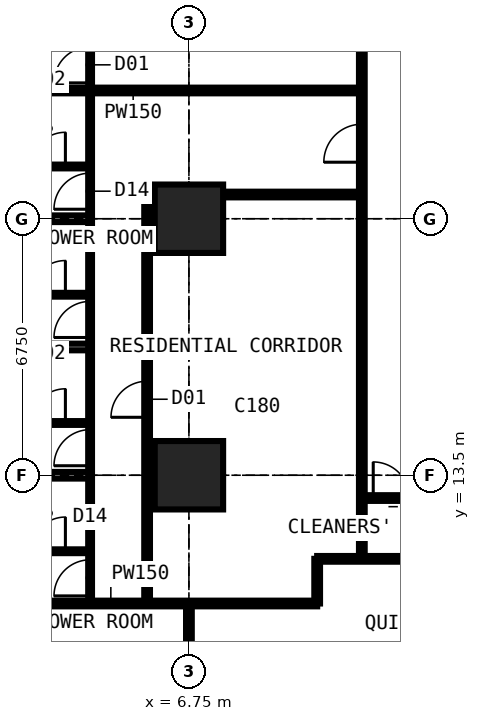
"""IFC4 building model, lengths in metres.
Left out: names, types, materials, properties, quantities, classifications, styles, units other than length and angle.
Written with IfcOpenShell. Run it as: python <this file> out.ifc"""

import sys

from ifc_helpers import new_model, si_unit, direction, frame, frame_2d, origin, origin_2d, place, context, subcontext, project, spatial, rectangle, extrude, element, fill, save


model = new_model("IFC4")
c1 = context("Model", 3, precision=1e-05, world=origin(), true_north=direction((0.0, 1.0)))
c2 = subcontext(c1, "Body", "Model", "MODEL_VIEW")
j1 = project(units=[si_unit("LENGTHUNIT", "METRE"), si_unit("PLANEANGLEUNIT", "RADIAN")], contexts=[c1])
p1 = place(None, origin())
s1 = spatial("IfcSite", under=j1, at=p1, CompositionType="ELEMENT")
p2 = place(p1, origin())
s2 = spatial("IfcBuilding", under=s1, at=p2, CompositionType="ELEMENT")
p3 = place(p2, frame((0.0, 0.0, 94.5)))
s3 = spatial("IfcBuildingStorey", under=s2, at=p3, CompositionType="ELEMENT", Elevation=94.5)
for number, where, z_axis, x_axis in (
    (1, (6.75, 13.5, 0.0), (0.0, 0.0, 1.0), (1.0, 0.0, 0.0)),
    (2, (6.75, 20.25, 0.0), (0.0, 0.0, 1.0), (1.0, 0.0, 0.0)),
):
    element("IfcColumn", number, at=place(p3, frame(where, z_axis=z_axis, x_axis=x_axis)), inside=s3, PredefinedType="COLUMN", context=c2, shape_type="SweptSolid", body=[
        extrude(rectangle(XDim=1.8, YDim=1.8, at=origin_2d()), origin(), (0.0, 0.0, 1.0), 3.6),
    ])
p4 = place(p3, frame((-0.734, 10.125, 0.0), z_axis=(0.0, 0.0, 1.0), x_axis=(1.0, 0.0, 0.0)))
e3 = element("IfcWall", 3, at=p4, inside=s3, PredefinedType="PARTITIONING", context=c2, shape_type="SweptSolid", body=[
    extrude(rectangle(XDim=10.859, YDim=0.15, at=frame_2d((5.429, 0.0))), origin(), (0.0, 0.0, 1.0), 3.375),
])
p5 = place(p3, frame((-0.734, 13.5, 0.0), z_axis=(0.0, 0.0, 1.0), x_axis=(1.0, 0.0, 0.0)))
e4 = element("IfcWall", 4, at=p5, inside=s3, PredefinedType="PARTITIONING", context=c2, shape_type="SweptSolid", body=[
    extrude(rectangle(XDim=4.884, YDim=0.175, at=frame_2d((2.442, 0.0))), origin(), (0.0, 0.0, 1.0), 2.877),
])
p6 = place(p3, frame((-0.734, 16.875, 0.0), z_axis=(0.0, 0.0, 1.0), x_axis=(1.0, 0.0, 0.0)))
e5 = element("IfcWall", 5, at=p6, inside=s3, PredefinedType="PARTITIONING", context=c2, shape_type="SweptSolid", body=[
    extrude(rectangle(XDim=4.884, YDim=0.175, at=frame_2d((2.442, 0.0))), origin(), (0.0, 0.0, 1.0), 3.375),
])
p7 = place(p3, frame((-0.734, 20.25, 0.0), z_axis=(0.0, 0.0, 1.0), x_axis=(1.0, 0.0, 0.0)))
e6 = element("IfcWall", 6, at=p7, inside=s3, PredefinedType="PARTITIONING", context=c2, shape_type="SweptSolid", body=[
    extrude(rectangle(XDim=4.884, YDim=0.175, at=frame_2d((2.442, 0.0))), origin(), (0.0, 0.0, 1.0), 2.877),
])
p8 = place(p3, frame((-0.734, 23.625, 0.0), z_axis=(0.0, 0.0, 1.0), x_axis=(1.0, 0.0, 0.0)))
e7 = element("IfcWall", 7, at=p8, inside=s3, PredefinedType="PARTITIONING", context=c2, shape_type="SweptSolid", body=[
    extrude(rectangle(XDim=12.034, YDim=0.15, at=frame_2d((6.017, 0.0))), origin(), (0.0, 0.0, 1.0), 3.375),
])
p9 = place(p3, frame((1.95, 11.5, 0.0), z_axis=(0.0, 0.0, 1.0), x_axis=(1.0, 0.0, 0.0)))
e8 = element("IfcWall", 8, at=p9, inside=s3, PredefinedType="PARTITIONING", context=c2, shape_type="SweptSolid", body=[
    extrude(rectangle(XDim=2.2, YDim=0.1, at=frame_2d((1.1, 0.0))), origin(), (0.0, 0.0, 1.0), 3.375),
])
p10 = place(p9, frame((0.65, 0.0, 0.0)))
e9 = element("IfcOpeningElement", 9, at=p10, cuts=e8, PredefinedType="OPENING", context=c2, shape_type="SweptSolid", body=[
    extrude(rectangle(XDim=0.9, YDim=2.2, at=frame_2d((0.45, 1.1))), frame((0.0, 0.06, 0.0), z_axis=(0.0, -1.0, 0.0), x_axis=(1.0, 0.0, 0.0)), (0.0, 0.0, 1.0), 0.12),
])
p11 = place(p3, frame((1.95, 14.875, 0.0), z_axis=(0.0, 0.0, 1.0), x_axis=(1.0, 0.0, 0.0)))
e10 = element("IfcWall", 10, at=p11, inside=s3, PredefinedType="PARTITIONING", context=c2, shape_type="SweptSolid", body=[
    extrude(rectangle(XDim=2.2, YDim=0.1, at=frame_2d((1.1, 0.0))), origin(), (0.0, 0.0, 1.0), 3.375),
])
p12 = place(p11, frame((0.65, 0.0, 0.0)))
e11 = element("IfcOpeningElement", 11, at=p12, cuts=e10, PredefinedType="OPENING", context=c2, shape_type="SweptSolid", body=[
    extrude(rectangle(XDim=0.9, YDim=2.2, at=frame_2d((0.45, 1.1))), frame((0.0, 0.06, 0.0), z_axis=(0.0, -1.0, 0.0), x_axis=(1.0, 0.0, 0.0)), (0.0, 0.0, 1.0), 0.12),
])
p13 = place(p3, frame((1.95, 18.25, 0.0), z_axis=(0.0, 0.0, 1.0), x_axis=(1.0, 0.0, 0.0)))
e12 = element("IfcWall", 12, at=p13, inside=s3, PredefinedType="PARTITIONING", context=c2, shape_type="SweptSolid", body=[
    extrude(rectangle(XDim=2.2, YDim=0.1, at=frame_2d((1.1, 0.0))), origin(), (0.0, 0.0, 1.0), 3.375),
])
p14 = place(p13, frame((0.65, 0.0, 0.0)))
e13 = element("IfcOpeningElement", 13, at=p14, cuts=e12, PredefinedType="OPENING", context=c2, shape_type="SweptSolid", body=[
    extrude(rectangle(XDim=0.9, YDim=2.2, at=frame_2d((0.45, 1.1))), frame((0.0, 0.06, 0.0), z_axis=(0.0, -1.0, 0.0), x_axis=(1.0, 0.0, 0.0)), (0.0, 0.0, 1.0), 0.12),
])
p15 = place(p3, frame((1.95, 21.625, 0.0), z_axis=(0.0, 0.0, 1.0), x_axis=(1.0, 0.0, 0.0)))
e14 = element("IfcWall", 14, at=p15, inside=s3, PredefinedType="PARTITIONING", context=c2, shape_type="SweptSolid", body=[
    extrude(rectangle(XDim=2.2, YDim=0.1, at=frame_2d((1.1, 0.0))), origin(), (0.0, 0.0, 1.0), 3.375),
])
p16 = place(p15, frame((0.65, 0.0, 0.0)))
e15 = element("IfcOpeningElement", 15, at=p16, cuts=e14, PredefinedType="OPENING", context=c2, shape_type="SweptSolid", body=[
    extrude(rectangle(XDim=0.9, YDim=2.2, at=frame_2d((0.45, 1.1))), frame((0.0, 0.06, 0.0), z_axis=(0.0, -1.0, 0.0), x_axis=(1.0, 0.0, 0.0)), (0.0, 0.0, 1.0), 0.12),
])
p17 = place(p3, frame((4.15, 10.125, 0.0), z_axis=(0.0, 0.0, 1.0), x_axis=(0.0, 1.0, 0.0)))
e16 = element("IfcWall", 16, at=p17, inside=s3, PredefinedType="PARTITIONING", context=c2, shape_type="SweptSolid", body=[
    extrude(rectangle(XDim=16.875, YDim=0.1, at=frame_2d((8.438, 0.0))), origin(), (0.0, 0.0, 1.0), 3.375),
])
p18 = place(p17, frame((13.7, 0.0, 0.0)))
e17 = element("IfcOpeningElement", 17, at=p18, cuts=e16, PredefinedType="OPENING", context=c2, shape_type="SweptSolid", body=[
    extrude(rectangle(XDim=0.95, YDim=2.2, at=frame_2d((0.475, 1.1))), frame((0.0, 0.06, 0.0), z_axis=(0.0, -1.0, 0.0), x_axis=(1.0, 0.0, 0.0)), (0.0, 0.0, 1.0), 0.12),
])
p19 = place(p17, frame((0.2, 0.0, 0.0)))
e18 = element("IfcOpeningElement", 18, at=p19, cuts=e16, PredefinedType="OPENING", context=c2, shape_type="SweptSolid", body=[
    extrude(rectangle(XDim=0.95, YDim=2.2, at=frame_2d((0.475, 1.1))), frame((0.0, 0.06, 0.0), z_axis=(0.0, -1.0, 0.0), x_axis=(1.0, 0.0, 0.0)), (0.0, 0.0, 1.0), 0.12),
])
p20 = place(p17, frame((3.625, 0.0, 0.0)))
e19 = element("IfcOpeningElement", 19, at=p20, cuts=e16, PredefinedType="OPENING", context=c2, shape_type="SweptSolid", body=[
    extrude(rectangle(XDim=0.95, YDim=2.2, at=frame_2d((0.475, 1.1))), frame((0.0, 0.06, 0.0), z_axis=(0.0, -1.0, 0.0), x_axis=(1.0, 0.0, 0.0)), (0.0, 0.0, 1.0), 0.12),
])
p21 = place(p17, frame((7.0, 0.0, 0.0)))
e20 = element("IfcOpeningElement", 20, at=p21, cuts=e16, PredefinedType="OPENING", context=c2, shape_type="SweptSolid", body=[
    extrude(rectangle(XDim=0.95, YDim=2.2, at=frame_2d((0.475, 1.1))), frame((0.0, 0.06, 0.0), z_axis=(0.0, -1.0, 0.0), x_axis=(1.0, 0.0, 0.0)), (0.0, 0.0, 1.0), 0.12),
])
p22 = place(p17, frame((10.375, 0.0, 0.0)))
e21 = element("IfcOpeningElement", 21, at=p22, cuts=e16, PredefinedType="OPENING", context=c2, shape_type="SweptSolid", body=[
    extrude(rectangle(XDim=0.95, YDim=2.2, at=frame_2d((0.475, 1.1))), frame((0.0, 0.06, 0.0), z_axis=(0.0, -1.0, 0.0), x_axis=(1.0, 0.0, 0.0)), (0.0, 0.0, 1.0), 0.12),
])
p23 = place(p3, frame((5.65, 10.125, 0.0), z_axis=(0.0, 0.0, 1.0), x_axis=(0.0, 1.0, 0.0)))
e22 = element("IfcWall", 22, at=p23, inside=s3, PredefinedType="PARTITIONING", context=c2, shape_type="SweptSolid", body=[
    extrude(rectangle(XDim=10.762, YDim=0.15, at=frame_2d((5.381, 0.0))), origin(), (0.0, 0.0, 1.0), 3.375),
])
p24 = place(p23, frame((4.9, 0.0, 0.0)))
e23 = element("IfcOpeningElement", 23, at=p24, cuts=e22, PredefinedType="OPENING", context=c2, shape_type="SweptSolid", body=[
    extrude(rectangle(XDim=0.95, YDim=2.2, at=frame_2d((0.475, 1.1))), frame((0.0, 0.085, 0.0), z_axis=(0.0, -1.0, 0.0), x_axis=(1.0, 0.0, 0.0)), (0.0, 0.0, 1.0), 0.17),
])
p25 = place(p3, frame((5.65, 20.887, 0.0), z_axis=(0.0, 0.0, 1.0), x_axis=(1.0, 0.0, 0.0)))
e24 = element("IfcWall", 24, at=p25, inside=s3, PredefinedType="PARTITIONING", context=c2, shape_type="SweptSolid", body=[
    extrude(rectangle(XDim=5.65, YDim=0.15, at=frame_2d((2.825, 0.0))), origin(), (0.0, 0.0, 1.0), 3.375),
])
p26 = place(p3, frame((6.75, 4.15, 0.0), z_axis=(0.0, 0.0, 1.0), x_axis=(0.0, 1.0, 0.0)))
e25 = element("IfcWall", 25, at=p26, inside=s3, PredefinedType="PARTITIONING", context=c2, shape_type="SweptSolid", body=[
    extrude(rectangle(XDim=5.975, YDim=0.15, at=frame_2d((2.988, 0.0))), origin(), (0.0, 0.0, 1.0), 2.877),
])
p27 = place(p3, frame((10.125, 10.125, 0.0), z_axis=(0.0, 0.0, 1.0), x_axis=(0.0, 1.0, 0.0)))
e26 = element("IfcWall", 26, at=p27, inside=s3, PredefinedType="PARTITIONING", context=c2, shape_type="SweptSolid", body=[
    extrude(rectangle(XDim=1.175, YDim=0.15, at=frame_2d((0.587, 0.0))), origin(), (0.0, 0.0, 1.0), 3.375),
])
p28 = place(p3, frame((10.125, 11.3, 0.0), z_axis=(0.0, 0.0, 1.0), x_axis=(1.0, 0.0, 0.0)))
e27 = element("IfcWall", 27, at=p28, inside=s3, PredefinedType="PARTITIONING", context=c2, shape_type="SweptSolid", body=[
    extrude(rectangle(XDim=20.675, YDim=0.15, at=frame_2d((10.337, 0.0))), origin(), (0.0, 0.0, 1.0), 3.375),
])
p29 = place(p28, frame((11.312, 0.0, 0.0)))
e28 = element("IfcOpeningElement", 28, at=p29, cuts=e27, PredefinedType="OPENING", context=c2, shape_type="SweptSolid", body=[
    extrude(rectangle(XDim=1.0, YDim=2.2, at=frame_2d((0.5, 1.1))), frame((0.0, 0.085, 0.0), z_axis=(0.0, -1.0, 0.0), x_axis=(1.0, 0.0, 0.0)), (0.0, 0.0, 1.0), 0.17),
])
p30 = place(p3, frame((11.3, 11.3, 0.0), z_axis=(0.0, 0.0, 1.0), x_axis=(0.0, 1.0, 0.0)))
e29 = element("IfcWall", 29, at=p30, inside=s3, PredefinedType="PARTITIONING", context=c2, shape_type="SweptSolid", body=[
    extrude(rectangle(XDim=19.3, YDim=0.15, at=frame_2d((9.65, 0.0))), origin(), (0.0, 0.0, 1.0), 3.375),
])
p31 = place(p30, frame((13.525, 0.0, 0.0)))
e30 = element("IfcOpeningElement", 30, at=p31, cuts=e29, PredefinedType="OPENING", context=c2, shape_type="SweptSolid", body=[
    extrude(rectangle(XDim=1.0, YDim=2.2, at=frame_2d((0.5, 1.1))), frame((0.0, 0.085, 0.0), z_axis=(0.0, -1.0, 0.0), x_axis=(1.0, 0.0, 0.0)), (0.0, 0.0, 1.0), 0.17),
])
p32 = place(p30, frame((10.438, 0.0, 0.0)))
e31 = element("IfcOpeningElement", 31, at=p32, cuts=e29, PredefinedType="OPENING", context=c2, shape_type="SweptSolid", body=[
    extrude(rectangle(XDim=1.0, YDim=2.2, at=frame_2d((0.5, 1.1))), frame((0.0, 0.085, 0.0), z_axis=(0.0, -1.0, 0.0), x_axis=(1.0, 0.0, 0.0)), (0.0, 0.0, 1.0), 0.17),
])
p33 = place(p3, frame((11.3, 12.9, 0.0), z_axis=(0.0, 0.0, 1.0), x_axis=(1.0, 0.0, 0.0)))
e32 = element("IfcWall", 32, at=p33, inside=s3, PredefinedType="PARTITIONING", context=c2, shape_type="SweptSolid", body=[
    extrude(rectangle(XDim=1.6, YDim=0.15, at=frame_2d((0.8, 0.0))), origin(), (0.0, 0.0, 1.0), 2.806),
])
p34 = place(p33, frame((0.3, 0.0, 0.0)))
e33 = element("IfcOpeningElement", 33, at=p34, cuts=e32, PredefinedType="OPENING", context=c2, shape_type="SweptSolid", body=[
    extrude(rectangle(XDim=0.95, YDim=2.2, at=frame_2d((0.475, 1.1))), frame((0.0, 0.085, 0.0), z_axis=(0.0, -1.0, 0.0), x_axis=(1.0, 0.0, 0.0)), (0.0, 0.0, 1.0), 0.17),
])
p35 = place(p34, origin())
e34 = element("IfcDoor", 34, at=p35, inside=s3, OperationType="SINGLE_SWING_LEFT", PredefinedType="DOOR", context=c2, shape_type="SweptSolid", body=[
    extrude(rectangle(XDim=0.95, YDim=2.2, at=frame_2d((0.475, 1.1))), frame((0.0, 0.025, 0.0), z_axis=(0.0, -1.0, 0.0), x_axis=(1.0, 0.0, 0.0)), (0.0, 0.0, 1.0), 0.05),
])
fill(e33, e34)
p36 = place(p18, origin())
e35 = element("IfcDoor", 35, at=p36, inside=s3, OperationType="SINGLE_SWING_LEFT", PredefinedType="DOOR", context=c2, shape_type="SweptSolid", body=[
    extrude(rectangle(XDim=0.95, YDim=2.2, at=frame_2d((0.475, 1.1))), frame((0.0, 0.025, 0.0), z_axis=(0.0, -1.0, 0.0), x_axis=(1.0, 0.0, 0.0)), (0.0, 0.0, 1.0), 0.05),
])
fill(e17, e35)
p37 = place(p19, origin())
e36 = element("IfcDoor", 36, at=p37, inside=s3, OperationType="SINGLE_SWING_LEFT", PredefinedType="DOOR", context=c2, shape_type="SweptSolid", body=[
    extrude(rectangle(XDim=0.95, YDim=2.2, at=frame_2d((0.475, 1.1))), frame((0.0, 0.025, 0.0), z_axis=(0.0, -1.0, 0.0), x_axis=(1.0, 0.0, 0.0)), (0.0, 0.0, 1.0), 0.05),
])
fill(e18, e36)
p38 = place(p10, origin())
e37 = element("IfcDoor", 37, at=p38, inside=s3, OperationType="SINGLE_SWING_RIGHT", PredefinedType="DOOR", context=c2, shape_type="SweptSolid", body=[
    extrude(rectangle(XDim=0.9, YDim=2.2, at=frame_2d((0.45, 1.1))), frame((0.0, 0.025, 0.0), z_axis=(0.0, -1.0, 0.0), x_axis=(1.0, 0.0, 0.0)), (0.0, 0.0, 1.0), 0.05),
])
fill(e9, e37)
p39 = place(p20, origin())
e38 = element("IfcDoor", 38, at=p39, inside=s3, OperationType="SINGLE_SWING_LEFT", PredefinedType="DOOR", context=c2, shape_type="SweptSolid", body=[
    extrude(rectangle(XDim=0.95, YDim=2.2, at=frame_2d((0.475, 1.1))), frame((0.0, 0.025, 0.0), z_axis=(0.0, -1.0, 0.0), x_axis=(1.0, 0.0, 0.0)), (0.0, 0.0, 1.0), 0.05),
])
fill(e19, e38)
p40 = place(p12, origin())
e39 = element("IfcDoor", 39, at=p40, inside=s3, OperationType="SINGLE_SWING_RIGHT", PredefinedType="DOOR", context=c2, shape_type="SweptSolid", body=[
    extrude(rectangle(XDim=0.9, YDim=2.2, at=frame_2d((0.45, 1.1))), frame((0.0, 0.025, 0.0), z_axis=(0.0, -1.0, 0.0), x_axis=(1.0, 0.0, 0.0)), (0.0, 0.0, 1.0), 0.05),
])
fill(e11, e39)
p41 = place(p21, origin())
e40 = element("IfcDoor", 40, at=p41, inside=s3, OperationType="SINGLE_SWING_LEFT", PredefinedType="DOOR", context=c2, shape_type="SweptSolid", body=[
    extrude(rectangle(XDim=0.95, YDim=2.2, at=frame_2d((0.475, 1.1))), frame((0.0, 0.025, 0.0), z_axis=(0.0, -1.0, 0.0), x_axis=(1.0, 0.0, 0.0)), (0.0, 0.0, 1.0), 0.05),
])
fill(e20, e40)
p42 = place(p14, origin())
e41 = element("IfcDoor", 41, at=p42, inside=s3, OperationType="SINGLE_SWING_RIGHT", PredefinedType="DOOR", context=c2, shape_type="SweptSolid", body=[
    extrude(rectangle(XDim=0.9, YDim=2.2, at=frame_2d((0.45, 1.1))), frame((0.0, 0.025, 0.0), z_axis=(0.0, -1.0, 0.0), x_axis=(1.0, 0.0, 0.0)), (0.0, 0.0, 1.0), 0.05),
])
fill(e13, e41)
p43 = place(p22, origin())
e42 = element("IfcDoor", 42, at=p43, inside=s3, OperationType="SINGLE_SWING_LEFT", PredefinedType="DOOR", context=c2, shape_type="SweptSolid", body=[
    extrude(rectangle(XDim=0.95, YDim=2.2, at=frame_2d((0.475, 1.1))), frame((0.0, 0.025, 0.0), z_axis=(0.0, -1.0, 0.0), x_axis=(1.0, 0.0, 0.0)), (0.0, 0.0, 1.0), 0.05),
])
fill(e21, e42)
p44 = place(p16, origin())
e43 = element("IfcDoor", 43, at=p44, inside=s3, OperationType="SINGLE_SWING_RIGHT", PredefinedType="DOOR", context=c2, shape_type="SweptSolid", body=[
    extrude(rectangle(XDim=0.9, YDim=2.2, at=frame_2d((0.45, 1.1))), frame((0.0, 0.025, 0.0), z_axis=(0.0, -1.0, 0.0), x_axis=(1.0, 0.0, 0.0)), (0.0, 0.0, 1.0), 0.05),
])
fill(e15, e43)
p45 = place(p32, origin())
e44 = element("IfcDoor", 44, at=p45, inside=s3, OperationType="SINGLE_SWING_LEFT", PredefinedType="DOOR", context=c2, shape_type="SweptSolid", body=[
    extrude(rectangle(XDim=1.0, YDim=2.2, at=frame_2d((0.5, 1.1))), frame((0.0, 0.025, 0.0), z_axis=(0.0, -1.0, 0.0), x_axis=(1.0, 0.0, 0.0)), (0.0, 0.0, 1.0), 0.05),
])
fill(e31, e44)
p46 = place(p24, origin())
e45 = element("IfcDoor", 45, at=p46, inside=s3, OperationType="SINGLE_SWING_LEFT", PredefinedType="DOOR", context=c2, shape_type="SweptSolid", body=[
    extrude(rectangle(XDim=0.95, YDim=2.2, at=frame_2d((0.475, 1.1))), frame((0.0, 0.025, 0.0), z_axis=(0.0, -1.0, 0.0), x_axis=(1.0, 0.0, 0.0)), (0.0, 0.0, 1.0), 0.05),
])
fill(e23, e45)
save(model, sys.argv[1])
